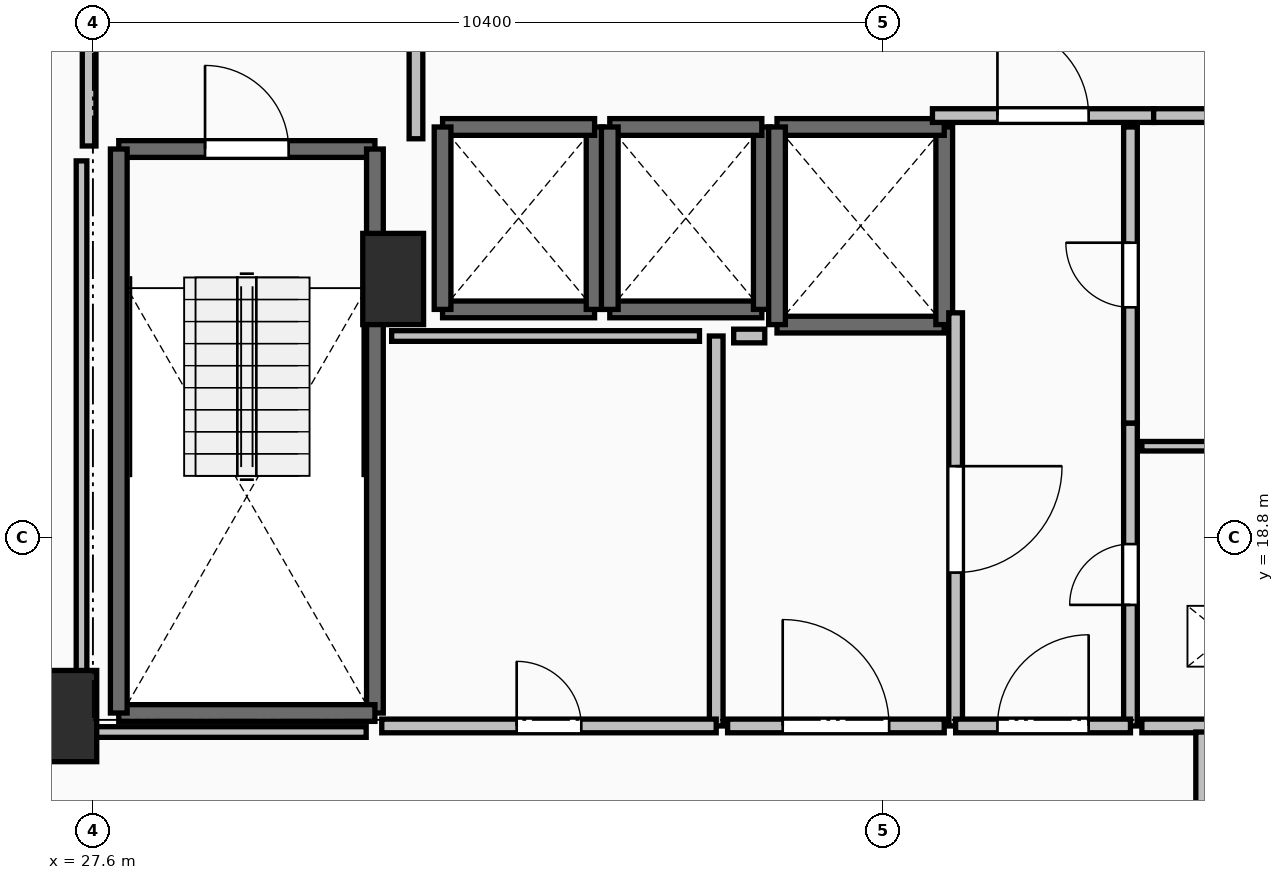
"""IFC4 building model, lengths in metres.
Left out: names, types, materials, properties, quantities, classifications, styles, units other than length and angle.
Written with IfcOpenShell. Run it as: python <this file> out.ifc"""

import sys

from ifc_helpers import new_model, si_unit, direction, frame, frame_2d, origin, origin_2d, place, context, subcontext, project, spatial, rectangle, extrude, element, fill, save


model = new_model("IFC4")
c1 = context("Model", 3, precision=1e-05, world=origin(), true_north=direction((0.0, 1.0)))
c2 = subcontext(c1, "Body", "Model", "MODEL_VIEW")
j1 = project(units=[si_unit("LENGTHUNIT", "METRE"), si_unit("PLANEANGLEUNIT", "RADIAN")], contexts=[c1])
p1 = place(None, origin())
s1 = spatial("IfcSite", under=j1, at=p1, CompositionType="ELEMENT")
p2 = place(p1, origin())
s2 = spatial("IfcBuilding", under=s1, at=p2, CompositionType="ELEMENT")
p3 = place(p2, frame((0.0, 0.0, 82.3)))
s3 = spatial("IfcBuildingStorey", under=s2, at=p3, CompositionType="ELEMENT", Elevation=82.3)
for number, where, z_axis, x_axis in (
    (1, (27.25, 16.45, 0.0), (0.0, 0.0, 1.0), (1.0, 0.0, 0.0)),
    (2, (31.55, 22.2, 0.0), (0.0, 0.0, 1.0), (1.0, 0.0, 0.0)),
):
    element("IfcColumn", number, at=place(p3, frame(where, z_axis=z_axis, x_axis=x_axis)), inside=s3, PredefinedType="PILASTER", context=c2, shape_type="SweptSolid", body=[
        extrude(rectangle(XDim=0.8, YDim=1.2, at=origin_2d()), origin(), (0.0, 0.0, 1.0), 3.5),
    ])
p4 = place(p3, frame((27.94, 23.91, 0.0), z_axis=(0.0, 0.0, 1.0), x_axis=(1.0, 0.0, 0.0)))
e3 = element("IfcWall", 3, at=p4, inside=s3, PredefinedType="SOLIDWALL", context=c2, shape_type="SweptSolid", body=[
    extrude(rectangle(XDim=3.37, YDim=0.22, at=frame_2d((1.685, 0.0))), origin(), (0.0, 0.0, 1.0), 3.24),
])
p5 = place(p4, frame((1.135, 0.0, 0.0)))
e4 = element("IfcOpeningElement", 4, at=p5, cuts=e3, PredefinedType="OPENING", context=c2, shape_type="SweptSolid", body=[
    extrude(rectangle(XDim=1.1, YDim=2.15, at=frame_2d((0.55, 1.075))), frame((0.0, 0.125, 0.0), z_axis=(0.0, -1.0, 0.0), x_axis=(1.0, 0.0, 0.0)), (0.0, 0.0, 1.0), 0.25),
])
p6 = place(p3, frame((31.31, 23.91, 0.0), z_axis=(0.0, 0.0, 1.0), x_axis=(0.0, -1.0, 0.0)))
e5 = element("IfcWall", 5, at=p6, inside=s3, PredefinedType="SOLIDWALL", context=c2, shape_type="SweptSolid", body=[
    extrude(rectangle(XDim=7.42, YDim=0.22, at=frame_2d((3.71, 0.0))), origin(), (0.0, 0.0, 1.0), 3.24),
])
p7 = place(p3, frame((31.31, 16.49, 0.0), z_axis=(0.0, 0.0, 1.0), x_axis=(-1.0, 0.0, 0.0)))
e6 = element("IfcWall", 6, at=p7, inside=s3, PredefinedType="SOLIDWALL", context=c2, shape_type="SweptSolid", body=[
    extrude(rectangle(XDim=3.37, YDim=0.22, at=frame_2d((1.685, 0.0))), origin(), (0.0, 0.0, 1.0), 3.24),
])
p8 = place(p3, frame((27.94, 16.49, 0.0), z_axis=(0.0, 0.0, 1.0), x_axis=(0.0, 1.0, 0.0)))
e7 = element("IfcWall", 7, at=p8, inside=s3, PredefinedType="SOLIDWALL", context=c2, shape_type="SweptSolid", body=[
    extrude(rectangle(XDim=7.42, YDim=0.22, at=frame_2d((3.71, 0.0))), origin(), (0.0, 0.0, 1.0), 3.24),
])
p9 = place(p3, frame((32.2, 21.8, 0.0), z_axis=(0.0, 0.0, 1.0), x_axis=(1.0, 0.0, 0.0)))
e8 = element("IfcWall", 8, at=p9, inside=s3, PredefinedType="SOLIDWALL", context=c2, shape_type="SweptSolid", body=[
    extrude(rectangle(XDim=2.0, YDim=0.22, at=frame_2d((1.0, 0.0))), origin(), (0.0, 0.0, 1.0), 3.24),
])
p10 = place(p3, frame((34.2, 21.8, 0.0), z_axis=(0.0, 0.0, 1.0), x_axis=(0.0, 1.0, 0.0)))
e9 = element("IfcWall", 9, at=p10, inside=s3, PredefinedType="SOLIDWALL", context=c2, shape_type="SweptSolid", body=[
    extrude(rectangle(XDim=2.4, YDim=0.22, at=frame_2d((1.2, 0.0))), origin(), (0.0, 0.0, 1.0), 3.24),
])
p11 = place(p3, frame((34.2, 24.2, 0.0), z_axis=(0.0, 0.0, 1.0), x_axis=(-1.0, 0.0, 0.0)))
e10 = element("IfcWall", 10, at=p11, inside=s3, PredefinedType="SOLIDWALL", context=c2, shape_type="SweptSolid", body=[
    extrude(rectangle(XDim=2.0, YDim=0.22, at=frame_2d((1.0, 0.0))), origin(), (0.0, 0.0, 1.0), 3.24),
])
p12 = place(p3, frame((32.2, 24.2, 0.0), z_axis=(0.0, 0.0, 1.0), x_axis=(0.0, -1.0, 0.0)))
e11 = element("IfcWall", 11, at=p12, inside=s3, PredefinedType="SOLIDWALL", context=c2, shape_type="SweptSolid", body=[
    extrude(rectangle(XDim=2.4, YDim=0.22, at=frame_2d((1.2, 0.0))), origin(), (0.0, 0.0, 1.0), 3.24),
])
p13 = place(p3, frame((34.4, 21.8, 0.0), z_axis=(0.0, 0.0, 1.0), x_axis=(1.0, 0.0, 0.0)))
e12 = element("IfcWall", 12, at=p13, inside=s3, PredefinedType="SOLIDWALL", context=c2, shape_type="SweptSolid", body=[
    extrude(rectangle(XDim=2.0, YDim=0.22, at=frame_2d((1.0, 0.0))), origin(), (0.0, 0.0, 1.0), 3.24),
])
p14 = place(p3, frame((36.4, 21.8, 0.0), z_axis=(0.0, 0.0, 1.0), x_axis=(0.0, 1.0, 0.0)))
e13 = element("IfcWall", 13, at=p14, inside=s3, PredefinedType="SOLIDWALL", context=c2, shape_type="SweptSolid", body=[
    extrude(rectangle(XDim=2.4, YDim=0.22, at=frame_2d((1.2, 0.0))), origin(), (0.0, 0.0, 1.0), 3.24),
])
p15 = place(p3, frame((36.4, 24.2, 0.0), z_axis=(0.0, 0.0, 1.0), x_axis=(-1.0, 0.0, 0.0)))
e14 = element("IfcWall", 14, at=p15, inside=s3, PredefinedType="SOLIDWALL", context=c2, shape_type="SweptSolid", body=[
    extrude(rectangle(XDim=2.0, YDim=0.22, at=frame_2d((1.0, 0.0))), origin(), (0.0, 0.0, 1.0), 3.24),
])
p16 = place(p3, frame((34.4, 24.2, 0.0), z_axis=(0.0, 0.0, 1.0), x_axis=(0.0, -1.0, 0.0)))
e15 = element("IfcWall", 15, at=p16, inside=s3, PredefinedType="SOLIDWALL", context=c2, shape_type="SweptSolid", body=[
    extrude(rectangle(XDim=2.4, YDim=0.22, at=frame_2d((1.2, 0.0))), origin(), (0.0, 0.0, 1.0), 3.24),
])
p17 = place(p3, frame((36.6, 21.6, 0.0), z_axis=(0.0, 0.0, 1.0), x_axis=(1.0, 0.0, 0.0)))
e16 = element("IfcWall", 16, at=p17, inside=s3, PredefinedType="SOLIDWALL", context=c2, shape_type="SweptSolid", body=[
    extrude(rectangle(XDim=2.2, YDim=0.22, at=frame_2d((1.1, 0.0))), origin(), (0.0, 0.0, 1.0), 3.24),
])
p18 = place(p3, frame((38.8, 21.6, 0.0), z_axis=(0.0, 0.0, 1.0), x_axis=(0.0, 1.0, 0.0)))
e17 = element("IfcWall", 17, at=p18, inside=s3, PredefinedType="SOLIDWALL", context=c2, shape_type="SweptSolid", body=[
    extrude(rectangle(XDim=2.6, YDim=0.22, at=frame_2d((1.3, 0.0))), origin(), (0.0, 0.0, 1.0), 3.24),
])
p19 = place(p3, frame((38.8, 24.2, 0.0), z_axis=(0.0, 0.0, 1.0), x_axis=(-1.0, 0.0, 0.0)))
e18 = element("IfcWall", 18, at=p19, inside=s3, PredefinedType="SOLIDWALL", context=c2, shape_type="SweptSolid", body=[
    extrude(rectangle(XDim=2.2, YDim=0.22, at=frame_2d((1.1, 0.0))), origin(), (0.0, 0.0, 1.0), 3.24),
])
p20 = place(p3, frame((36.6, 24.2, 0.0), z_axis=(0.0, 0.0, 1.0), x_axis=(0.0, -1.0, 0.0)))
e19 = element("IfcWall", 19, at=p20, inside=s3, PredefinedType="SOLIDWALL", context=c2, shape_type="SweptSolid", body=[
    extrude(rectangle(XDim=2.6, YDim=0.22, at=frame_2d((1.3, 0.0))), origin(), (0.0, 0.0, 1.0), 3.24),
])
p21 = place(p3, frame((31.85, 24.045, 0.0), z_axis=(0.0, 0.0, 1.0), x_axis=(0.0, 1.0, 0.0)))
e20 = element("IfcWall", 20, at=p21, inside=s3, PredefinedType="PARTITIONING", context=c2, shape_type="SweptSolid", body=[
    extrude(rectangle(XDim=3.91, YDim=0.18, at=frame_2d((1.955, 0.0))), origin(), (0.0, 0.0, 1.0), 3.24),
])
p22 = place(p21, frame((1.355, 0.0, 0.0)))
e21 = element("IfcOpeningElement", 21, at=p22, cuts=e20, PredefinedType="OPENING", context=c2, shape_type="SweptSolid", body=[
    extrude(rectangle(XDim=1.2, YDim=2.15, at=frame_2d((0.6, 1.075))), frame((0.0, 0.105, 0.0), z_axis=(0.0, -1.0, 0.0), x_axis=(1.0, 0.0, 0.0)), (0.0, 0.0, 1.0), 0.21),
])
p23 = place(p3, frame((27.55, 28.0, 0.0), z_axis=(0.0, 0.0, 1.0), x_axis=(0.0, -1.0, 0.0)))
e22 = element("IfcWall", 22, at=p23, inside=s3, PredefinedType="PARTITIONING", context=c2, shape_type="SweptSolid", body=[
    extrude(rectangle(XDim=4.05, YDim=0.18, at=frame_2d((2.025, 0.0))), origin(), (0.0, 0.0, 1.0), 3.24),
])
p24 = place(p23, frame((1.425, 0.0, 0.0)))
e23 = element("IfcOpeningElement", 23, at=p24, cuts=e22, PredefinedType="OPENING", context=c2, shape_type="SweptSolid", body=[
    extrude(rectangle(XDim=1.2, YDim=2.15, at=frame_2d((0.6, 1.075))), frame((0.0, 0.105, 0.0), z_axis=(0.0, -1.0, 0.0), x_axis=(1.0, 0.0, 0.0)), (0.0, 0.0, 1.0), 0.21),
])
p25 = place(p3, frame((38.645, 24.35, 0.0), z_axis=(0.0, 0.0, 1.0), x_axis=(1.0, 0.0, 0.0)))
e24 = element("IfcWall", 24, at=p25, inside=s3, PredefinedType="PARTITIONING", context=c2, shape_type="SweptSolid", body=[
    extrude(rectangle(XDim=2.91, YDim=0.18, at=frame_2d((1.455, 0.0))), origin(), (0.0, 0.0, 1.0), 3.24),
])
p26 = place(p25, frame((0.855, 0.0, 0.0)))
e25 = element("IfcOpeningElement", 25, at=p26, cuts=e24, PredefinedType="OPENING", context=c2, shape_type="SweptSolid", body=[
    extrude(rectangle(XDim=1.2, YDim=2.15, at=frame_2d((0.6, 1.075))), frame((0.0, 0.105, 0.0), z_axis=(0.0, -1.0, 0.0), x_axis=(1.0, 0.0, 0.0)), (0.0, 0.0, 1.0), 0.21),
])
p27 = place(p3, frame((41.555, 24.35, 0.0), z_axis=(0.0, 0.0, 1.0), x_axis=(1.0, 0.0, 0.0)))
e26 = element("IfcWall", 26, at=p27, inside=s3, PredefinedType="PARTITIONING", context=c2, shape_type="SweptSolid", body=[
    extrude(rectangle(XDim=2.445, YDim=0.18, at=frame_2d((1.223, 0.0))), origin(), (0.0, 0.0, 1.0), 3.24),
])
p28 = place(p27, frame((0.798, 0.0, 0.0)))
e27 = element("IfcOpeningElement", 27, at=p28, cuts=e26, PredefinedType="OPENING", context=c2, shape_type="SweptSolid", body=[
    extrude(rectangle(XDim=0.85, YDim=2.1, at=frame_2d((0.425, 1.05))), frame((0.0, 0.105, 0.0), z_axis=(0.0, -1.0, 0.0), x_axis=(1.0, 0.0, 0.0)), (0.0, 0.0, 1.0), 0.21),
])
p29 = place(p3, frame((41.25, 16.32, 0.0), z_axis=(0.0, 0.0, 1.0), x_axis=(0.0, 1.0, 0.0)))
e28 = element("IfcWall", 28, at=p29, inside=s3, PredefinedType="PARTITIONING", context=c2, shape_type="SweptSolid", body=[
    extrude(rectangle(XDim=3.985, YDim=0.18, at=frame_2d((1.992, 0.0))), origin(), (0.0, 0.0, 1.0), 3.24),
])
p30 = place(p29, frame((1.593, 0.0, 0.0)))
e29 = element("IfcOpeningElement", 29, at=p30, cuts=e28, PredefinedType="OPENING", context=c2, shape_type="SweptSolid", body=[
    extrude(rectangle(XDim=0.8, YDim=2.05, at=frame_2d((0.4, 1.025))), frame((0.0, 0.105, 0.0), z_axis=(0.0, -1.0, 0.0), x_axis=(1.0, 0.0, 0.0)), (0.0, 0.0, 1.0), 0.21),
])
p31 = place(p3, frame((41.25, 20.305, 0.0), z_axis=(0.0, 0.0, 1.0), x_axis=(0.0, 1.0, 0.0)))
e30 = element("IfcWall", 30, at=p31, inside=s3, PredefinedType="PARTITIONING", context=c2, shape_type="SweptSolid", body=[
    extrude(rectangle(XDim=3.895, YDim=0.18, at=frame_2d((1.948, 0.0))), origin(), (0.0, 0.0, 1.0), 3.24),
])
p32 = place(p31, frame((1.522, 0.0, 0.0)))
e31 = element("IfcOpeningElement", 31, at=p32, cuts=e30, PredefinedType="OPENING", context=c2, shape_type="SweptSolid", body=[
    extrude(rectangle(XDim=0.85, YDim=2.1, at=frame_2d((0.425, 1.05))), frame((0.0, 0.105, 0.0), z_axis=(0.0, -1.0, 0.0), x_axis=(1.0, 0.0, 0.0)), (0.0, 0.0, 1.0), 0.21),
])
p33 = place(p3, frame((38.95, 21.755, 0.0), z_axis=(0.0, 0.0, 1.0), x_axis=(0.0, -1.0, 0.0)))
e32 = element("IfcWall", 32, at=p33, inside=s3, PredefinedType="PARTITIONING", context=c2, shape_type="SweptSolid", body=[
    extrude(rectangle(XDim=5.435, YDim=0.18, at=frame_2d((2.717, 0.0))), origin(), (0.0, 0.0, 1.0), 3.24),
])
p34 = place(p33, frame((2.018, 0.0, 0.0)))
e33 = element("IfcOpeningElement", 33, at=p34, cuts=e32, PredefinedType="OPENING", context=c2, shape_type="SweptSolid", body=[
    extrude(rectangle(XDim=1.4, YDim=2.2, at=frame_2d((0.7, 1.1))), frame((0.0, 0.105, 0.0), z_axis=(0.0, -1.0, 0.0), x_axis=(1.0, 0.0, 0.0)), (0.0, 0.0, 1.0), 0.21),
])
p35 = place(p3, frame((38.95, 16.32, 0.0), z_axis=(0.0, 0.0, 1.0), x_axis=(1.0, 0.0, 0.0)))
e34 = element("IfcWall", 34, at=p35, inside=s3, PredefinedType="PARTITIONING", context=c2, shape_type="SweptSolid", body=[
    extrude(rectangle(XDim=2.3, YDim=0.18, at=frame_2d((1.15, 0.0))), origin(), (0.0, 0.0, 1.0), 3.24),
])
p36 = place(p35, frame((0.55, 0.0, 0.0)))
e35 = element("IfcOpeningElement", 35, at=p36, cuts=e34, PredefinedType="OPENING", context=c2, shape_type="SweptSolid", body=[
    extrude(rectangle(XDim=1.2, YDim=2.15, at=frame_2d((0.6, 1.075))), frame((0.0, 0.105, 0.0), z_axis=(0.0, -1.0, 0.0), x_axis=(1.0, 0.0, 0.0)), (0.0, 0.0, 1.0), 0.21),
])
p37 = place(p3, frame((44.6, 20.0, 0.0), z_axis=(0.0, 0.0, 1.0), x_axis=(-1.0, 0.0, 0.0)))
e36 = element("IfcWall", 36, at=p37, inside=s3, PredefinedType="PARTITIONING", context=c2, shape_type="SweptSolid", body=[
    extrude(rectangle(XDim=3.2, YDim=0.125, at=frame_2d((1.6, 0.0))), origin(), (0.0, 0.0, 1.0), 3.24),
])
p38 = place(p3, frame((41.4, 16.32, 0.0), z_axis=(0.0, 0.0, 1.0), x_axis=(1.0, 0.0, 0.0)))
e37 = element("IfcWall", 37, at=p38, inside=s3, PredefinedType="PARTITIONING", context=c2, shape_type="SweptSolid", body=[
    extrude(rectangle(XDim=3.2, YDim=0.18, at=frame_2d((1.6, 0.0))), origin(), (0.0, 0.0, 1.0), 3.24),
])
p39 = place(p38, frame((1.2, 0.0, 0.0)))
e38 = element("IfcOpeningElement", 38, at=p39, cuts=e37, PredefinedType="OPENING", context=c2, shape_type="SweptSolid", body=[
    extrude(rectangle(XDim=0.8, YDim=2.05, at=frame_2d((0.4, 1.025))), frame((0.0, 0.105, 0.0), z_axis=(0.0, -1.0, 0.0), x_axis=(1.0, 0.0, 0.0)), (0.0, 0.0, 1.0), 0.21),
])
p40 = place(p3, frame((35.8, 16.32, 0.0), z_axis=(0.0, 0.0, 1.0), x_axis=(0.0, 1.0, 0.0)))
e39 = element("IfcWall", 39, at=p40, inside=s3, PredefinedType="PARTITIONING", context=c2, shape_type="SweptSolid", body=[
    extrude(rectangle(XDim=5.13, YDim=0.18, at=frame_2d((2.565, 0.0))), origin(), (0.0, 0.0, 1.0), 3.24),
])
p41 = place(p3, frame((31.4, 16.32, 0.0), z_axis=(0.0, 0.0, 1.0), x_axis=(1.0, 0.0, 0.0)))
e40 = element("IfcWall", 40, at=p41, inside=s3, PredefinedType="PARTITIONING", context=c2, shape_type="SweptSolid", body=[
    extrude(rectangle(XDim=4.4, YDim=0.18, at=frame_2d((2.2, 0.0))), origin(), (0.0, 0.0, 1.0), 3.24),
])
p42 = place(p41, frame((1.775, 0.0, 0.0)))
e41 = element("IfcOpeningElement", 41, at=p42, cuts=e40, PredefinedType="OPENING", context=c2, shape_type="SweptSolid", body=[
    extrude(rectangle(XDim=0.85, YDim=2.1, at=frame_2d((0.425, 1.05))), frame((0.0, 0.105, 0.0), z_axis=(0.0, -1.0, 0.0), x_axis=(1.0, 0.0, 0.0)), (0.0, 0.0, 1.0), 0.21),
])
p43 = place(p3, frame((35.95, 16.32, 0.0), z_axis=(0.0, 0.0, 1.0), x_axis=(1.0, 0.0, 0.0)))
e42 = element("IfcWall", 42, at=p43, inside=s3, PredefinedType="PARTITIONING", context=c2, shape_type="SweptSolid", body=[
    extrude(rectangle(XDim=2.85, YDim=0.18, at=frame_2d((1.425, 0.0))), origin(), (0.0, 0.0, 1.0), 3.24),
])
p44 = place(p43, frame((0.725, 0.0, 0.0)))
e43 = element("IfcOpeningElement", 43, at=p44, cuts=e42, PredefinedType="OPENING", context=c2, shape_type="SweptSolid", body=[
    extrude(rectangle(XDim=1.4, YDim=2.2, at=frame_2d((0.7, 1.1))), frame((0.0, 0.105, 0.0), z_axis=(0.0, -1.0, 0.0), x_axis=(1.0, 0.0, 0.0)), (0.0, 0.0, 1.0), 0.21),
])
p45 = place(p3, frame((42.2, 14.1, 0.0), z_axis=(0.0, 0.0, 1.0), x_axis=(0.0, 1.0, 0.0)))
e44 = element("IfcWall", 44, at=p45, inside=s3, PredefinedType="PARTITIONING", context=c2, shape_type="SweptSolid", body=[
    extrude(rectangle(XDim=2.14, YDim=0.18, at=frame_2d((1.07, 0.0))), origin(), (0.0, 0.0, 1.0), 2.922),
])
p46 = place(p3, frame((35.58, 21.45, 0.0), z_axis=(0.0, 0.0, 1.0), x_axis=(-1.0, 0.0, 0.0)))
e45 = element("IfcWall", 45, at=p46, inside=s3, PredefinedType="PARTITIONING", context=c2, shape_type="SweptSolid", body=[
    extrude(rectangle(XDim=4.05, YDim=0.14, at=frame_2d((2.025, 0.0))), origin(), (0.0, 0.0, 1.0), 3.24),
])
p47 = place(p3, frame((36.439, 21.45, 0.0), z_axis=(0.0, 0.0, 1.0), x_axis=(-1.0, 0.0, 0.0)))
e46 = element("IfcWall", 46, at=p47, inside=s3, PredefinedType="PARTITIONING", context=c2, shape_type="SweptSolid", body=[
    extrude(rectangle(XDim=0.409, YDim=0.18, at=frame_2d((0.205, 0.0))), origin(), (0.0, 0.0, 1.0), 3.24),
])
p48 = place(p3, frame((31.195, 16.24, 0.0), z_axis=(0.0, 0.0, 1.0), x_axis=(-1.0, 0.0, 0.0)))
e47 = element("IfcWall", 47, at=p48, inside=s3, PredefinedType="PARTITIONING", context=c2, shape_type="SweptSolid", body=[
    extrude(rectangle(XDim=3.745, YDim=0.14, at=frame_2d((1.873, 0.0))), origin(), (0.0, 0.0, 1.0), 2.432),
])
p49 = place(p3, frame((27.45, 16.24, 0.0), z_axis=(0.0, 0.0, 1.0), x_axis=(0.0, 1.0, 0.0)))
e48 = element("IfcWall", 48, at=p49, inside=s3, PredefinedType="PARTITIONING", context=c2, shape_type="SweptSolid", body=[
    extrude(rectangle(XDim=7.514, YDim=0.14, at=frame_2d((3.757, 0.0))), origin(), (0.0, 0.0, 1.0), 2.432),
])
p50 = place(p5, origin())
e49 = element("IfcDoor", 49, at=p50, inside=s3, OperationType="SINGLE_SWING_LEFT", PredefinedType="DOOR", context=c2, shape_type="SweptSolid", body=[
    extrude(rectangle(XDim=1.1, YDim=2.15, at=frame_2d((0.55, 1.075))), frame((0.0, 0.025, 0.0), z_axis=(0.0, -1.0, 0.0), x_axis=(1.0, 0.0, 0.0)), (0.0, 0.0, 1.0), 0.05),
])
fill(e4, e49)
p51 = place(p26, origin())
e50 = element("IfcDoor", 50, at=p51, inside=s3, OperationType="SINGLE_SWING_LEFT", PredefinedType="DOOR", context=c2, shape_type="SweptSolid", body=[
    extrude(rectangle(XDim=1.2, YDim=2.15, at=frame_2d((0.6, 1.075))), frame((0.0, 0.025, 0.0), z_axis=(0.0, -1.0, 0.0), x_axis=(1.0, 0.0, 0.0)), (0.0, 0.0, 1.0), 0.05),
])
fill(e25, e50)
p52 = place(p30, origin())
e51 = element("IfcDoor", 51, at=p52, inside=s3, OperationType="SINGLE_SWING_LEFT", PredefinedType="DOOR", context=c2, shape_type="SweptSolid", body=[
    extrude(rectangle(XDim=0.8, YDim=2.05, at=frame_2d((0.4, 1.025))), frame((0.0, 0.025, 0.0), z_axis=(0.0, -1.0, 0.0), x_axis=(1.0, 0.0, 0.0)), (0.0, 0.0, 1.0), 0.05),
])
fill(e29, e51)
p53 = place(p32, origin())
e52 = element("IfcDoor", 52, at=p53, inside=s3, OperationType="SINGLE_SWING_RIGHT", PredefinedType="DOOR", context=c2, shape_type="SweptSolid", body=[
    extrude(rectangle(XDim=0.85, YDim=2.1, at=frame_2d((0.425, 1.05))), frame((0.0, 0.025, 0.0), z_axis=(0.0, -1.0, 0.0), x_axis=(1.0, 0.0, 0.0)), (0.0, 0.0, 1.0), 0.05),
])
fill(e31, e52)
p54 = place(p34, origin())
e53 = element("IfcDoor", 53, at=p54, inside=s3, OperationType="DOUBLE_SWING_LEFT", PredefinedType="DOOR", context=c2, shape_type="SweptSolid", body=[
    extrude(rectangle(XDim=1.4, YDim=2.2, at=frame_2d((0.7, 1.1))), frame((0.0, 0.025, 0.0), z_axis=(0.0, -1.0, 0.0), x_axis=(1.0, 0.0, 0.0)), (0.0, 0.0, 1.0), 0.05),
])
fill(e33, e53)
p55 = place(p36, origin())
e54 = element("IfcDoor", 54, at=p55, inside=s3, OperationType="SINGLE_SWING_RIGHT", PredefinedType="DOOR", context=c2, shape_type="SweptSolid", body=[
    extrude(rectangle(XDim=1.2, YDim=2.15, at=frame_2d((0.6, 1.075))), frame((0.0, 0.025, 0.0), z_axis=(0.0, -1.0, 0.0), x_axis=(1.0, 0.0, 0.0)), (0.0, 0.0, 1.0), 0.05),
])
fill(e35, e54)
p56 = place(p42, origin())
e55 = element("IfcDoor", 55, at=p56, inside=s3, OperationType="SINGLE_SWING_LEFT", PredefinedType="DOOR", context=c2, shape_type="SweptSolid", body=[
    extrude(rectangle(XDim=0.85, YDim=2.1, at=frame_2d((0.425, 1.05))), frame((0.0, 0.025, 0.0), z_axis=(0.0, -1.0, 0.0), x_axis=(1.0, 0.0, 0.0)), (0.0, 0.0, 1.0), 0.05),
])
fill(e41, e55)
p57 = place(p44, origin())
e56 = element("IfcDoor", 56, at=p57, inside=s3, OperationType="DOUBLE_SWING_LEFT", PredefinedType="DOOR", context=c2, shape_type="SweptSolid", body=[
    extrude(rectangle(XDim=1.4, YDim=2.2, at=frame_2d((0.7, 1.1))), frame((0.0, 0.025, 0.0), z_axis=(0.0, -1.0, 0.0), x_axis=(1.0, 0.0, 0.0)), (0.0, 0.0, 1.0), 0.05),
])
fill(e43, e56)
save(model, sys.argv[1])
